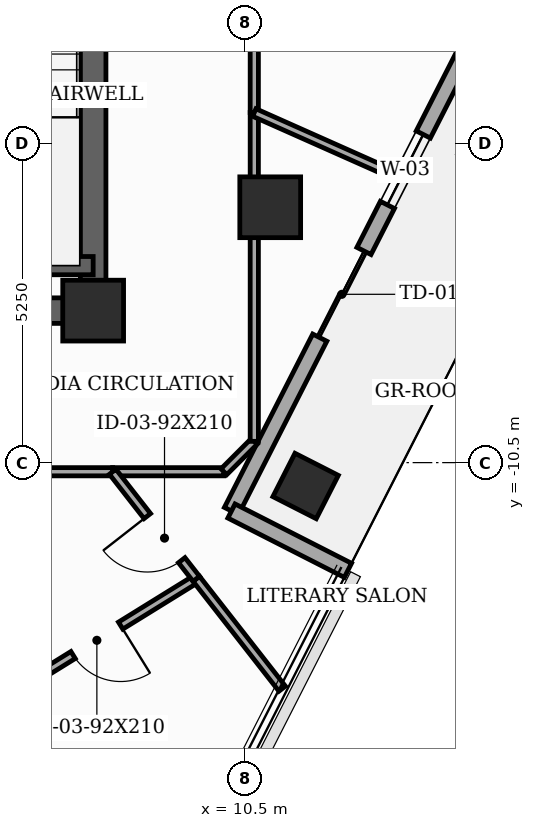
"""IFC4 building model, lengths in metres.
Left out: names, types, materials, properties, quantities, classifications, styles, units other than length and angle.
Written with IfcOpenShell. Run it as: python <this file> out.ifc"""

import sys

from ifc_helpers import new_model, si_unit, direction, frame, frame_2d, origin, origin_2d, place, context, subcontext, project, spatial, rectangle, extrude, element, fill, save


model = new_model("IFC4")
c1 = context("Model", 3, precision=1e-05, world=origin(), true_north=direction((0.0, 1.0)))
c2 = subcontext(c1, "Body", "Model", "MODEL_VIEW")
j1 = project(units=[si_unit("LENGTHUNIT", "METRE"), si_unit("PLANEANGLEUNIT", "RADIAN")], contexts=[c1])
p1 = place(None, origin())
s1 = spatial("IfcSite", under=j1, at=p1, CompositionType="ELEMENT")
p2 = place(p1, origin())
s2 = spatial("IfcBuilding", under=s1, at=p2, CompositionType="ELEMENT")
p3 = place(p2, frame((0.0, 0.0, 252.2)))
s3 = spatial("IfcBuildingStorey", under=s2, at=p3, CompositionType="ELEMENT", Elevation=252.2)
for number, where, z_axis, x_axis in (
    (1, (8.0, -8.0, 0.0), (0.0, 0.0, 1.0), (1.0, 0.0, 0.0)),
    (2, (10.912, -6.3, 0.0), (0.0, 0.0, 1.0), (1.0, 0.0, 0.0)),
):
    element("IfcColumn", number, at=place(p3, frame(where, z_axis=z_axis, x_axis=x_axis)), inside=s3, PredefinedType="COLUMN", context=c2, shape_type="SweptSolid", body=[
        extrude(rectangle(XDim=1.0, YDim=1.0, at=origin_2d()), origin(), (0.0, 0.0, 1.0), 3.7),
    ])
p4 = place(p3, frame((11.494, -10.885, 0.0), z_axis=(0.0, 0.0, 1.0), x_axis=(0.45399049974, 0.891006524188, 0.0)))
e3 = element("IfcColumn", 3, at=p4, inside=s3, PredefinedType="COLUMN", context=c2, shape_type="SweptSolid", body=[
    extrude(rectangle(XDim=0.8, YDim=0.8, at=origin_2d()), origin(), (0.0, 0.0, 1.0), 3.7),
])
p5 = place(p3, frame((10.274, -11.296, 0.0), z_axis=(0.0, 0.0, 1.0), x_axis=(0.453991476178, 0.891006026667, 0.0)))
e4 = element("IfcWall", 4, at=p5, inside=s3, PredefinedType="SOLIDWALL", context=c2, shape_type="SweptSolid", body=[
    extrude(rectangle(XDim=10.8, YDim=0.26, at=frame_2d((5.4, 0.0))), origin(), (0.0, 0.0, 1.0), 3.5),
])
p6 = place(p5, frame((3.2, 0.0, 0.0)))
e5 = element("IfcOpeningElement", 5, at=p6, cuts=e4, PredefinedType="OPENING", context=c2, shape_type="SweptSolid", body=[
    extrude(rectangle(XDim=1.6, YDim=2.08, at=frame_2d((0.8, 1.04))), frame((0.0, 0.14, 0.0), z_axis=(0.0, -1.0, 0.0), x_axis=(1.0, 0.0, 0.0)), (0.0, 0.0, 1.0), 0.28),
])
p7 = place(p5, frame((5.65, 0.0, 0.85)))
e6 = element("IfcOpeningElement", 6, at=p7, cuts=e4, PredefinedType="OPENING", context=c2, shape_type="SweptSolid", body=[
    extrude(rectangle(XDim=1.3, YDim=1.25, at=frame_2d((0.65, 0.625))), frame((0.0, 0.14, 0.0), z_axis=(0.0, -1.0, 0.0), x_axis=(1.0, 0.0, 0.0)), (0.0, 0.0, 1.0), 0.28),
])
p8 = place(p3, frame((12.19, -12.272, 0.0), z_axis=(0.0, 0.0, 1.0), x_axis=(-0.890994427822, 0.454014239413, 0.0)))
e7 = element("IfcWall", 7, at=p8, inside=s3, PredefinedType="SOLIDWALL", context=c2, shape_type="SweptSolid", body=[
    extrude(rectangle(XDim=2.15, YDim=0.26, at=frame_2d((1.075, 0.0))), origin(), (0.0, 0.0, 1.0), 3.5),
])
p9 = place(p3, frame((8.0, -8.0, 0.0), z_axis=(0.0, 0.0, 1.0), x_axis=(0.0, 1.0, 0.0)))
e8 = element("IfcWall", 8, at=p9, inside=s3, PredefinedType="SHEAR", context=c2, shape_type="SweptSolid", body=[
    extrude(rectangle(XDim=16.0, YDim=0.42, at=frame_2d((8.0, 0.0))), origin(), (0.0, 0.0, 1.0), 3.5),
])
p10 = place(p9, frame((9.6, 0.0, 0.0)))
e9 = element("IfcOpeningElement", 9, at=p10, cuts=e8, PredefinedType="OPENING", context=c2, shape_type="SweptSolid", body=[
    extrude(rectangle(XDim=1.05, YDim=2.15, at=frame_2d((0.525, 1.075))), frame((0.0, 0.22, 0.0), z_axis=(0.0, -1.0, 0.0), x_axis=(1.0, 0.0, 0.0)), (0.0, 0.0, 1.0), 0.44),
])
p11 = place(p9, frame((14.469, 0.0, 0.0)))
e10 = element("IfcOpeningElement", 10, at=p11, cuts=e8, PredefinedType="OPENING", context=c2, shape_type="SweptSolid", body=[
    extrude(rectangle(XDim=0.85, YDim=2.02, at=frame_2d((0.425, 1.01))), frame((0.0, 0.22, 0.0), z_axis=(0.0, -1.0, 0.0), x_axis=(1.0, 0.0, 0.0)), (0.0, 0.0, 1.0), 0.44),
])
p12 = place(p3, frame((-8.0, -8.0, 0.0), z_axis=(0.0, 0.0, 1.0), x_axis=(1.0, 0.0, 0.0)))
e11 = element("IfcWall", 11, at=p12, inside=s3, PredefinedType="SHEAR", context=c2, shape_type="SweptSolid", body=[
    extrude(rectangle(XDim=16.0, YDim=0.42, at=frame_2d((8.0, 0.0))), origin(), (0.0, 0.0, 1.0), 3.5),
])
p13 = place(p12, frame((7.52, 0.0, 0.0)))
e12 = element("IfcOpeningElement", 12, at=p13, cuts=e11, PredefinedType="OPENING", context=c2, shape_type="SweptSolid", body=[
    extrude(rectangle(XDim=0.95, YDim=2.1, at=frame_2d((0.475, 1.05))), frame((0.0, 0.22, 0.0), z_axis=(0.0, -1.0, 0.0), x_axis=(1.0, 0.0, 0.0)), (0.0, 0.0, 1.0), 0.44),
])
p14 = place(p3, frame((4.45, -7.26, 0.0), z_axis=(0.0, 0.0, 1.0), x_axis=(1.0, 0.0, 0.0)))
e13 = element("IfcWall", 13, at=p14, inside=s3, PredefinedType="SHEAR", context=c2, shape_type="SweptSolid", body=[
    extrude(rectangle(XDim=3.55, YDim=0.3, at=frame_2d((1.775, 0.0))), origin(), (0.0, 0.0, 1.0), 3.5),
])
p15 = place(p3, frame((10.65, -4.742, 0.0), z_axis=(0.0, 0.0, 1.0), x_axis=(0.0, 1.0, 0.0)))
e14 = element("IfcWall", 14, at=p15, inside=s3, PredefinedType="PARTITIONING", context=c2, shape_type="SweptSolid", body=[
    extrude(rectangle(XDim=6.224, YDim=0.135, at=frame_2d((3.112, 0.0))), origin(), (0.0, 0.0, 1.0), 2.885),
])
p16 = place(p15, frame((2.637, 0.0, 0.0)))
e15 = element("IfcOpeningElement", 15, at=p16, cuts=e14, PredefinedType="OPENING", context=c2, shape_type="SweptSolid", body=[
    extrude(rectangle(XDim=0.95, YDim=2.1, at=frame_2d((0.475, 1.05))), frame((0.0, 0.077, 0.0), z_axis=(0.0, -1.0, 0.0), x_axis=(1.0, 0.0, 0.0)), (0.0, 0.0, 1.0), 0.155),
])
p17 = place(p3, frame((2.45, -10.65, 0.0), z_axis=(0.0, 0.0, 1.0), x_axis=(1.0, 0.0, 0.0)))
e16 = element("IfcWall", 16, at=p17, inside=s3, PredefinedType="PARTITIONING", context=c2, shape_type="SweptSolid", body=[
    extrude(rectangle(XDim=5.871, YDim=0.135, at=frame_2d((2.936, 0.0))), origin(), (0.0, 0.0, 1.0), 2.885),
])
p18 = place(p17, frame((0.699, 0.0, 0.0)))
e17 = element("IfcOpeningElement", 17, at=p18, cuts=e16, PredefinedType="OPENING", context=c2, shape_type="SweptSolid", body=[
    extrude(rectangle(XDim=0.95, YDim=2.1, at=frame_2d((0.475, 1.05))), frame((0.0, 0.077, 0.0), z_axis=(0.0, -1.0, 0.0), x_axis=(1.0, 0.0, 0.0)), (0.0, 0.0, 1.0), 0.155),
])
p19 = place(p3, frame((8.321, -10.65, 0.0), z_axis=(0.0, 0.0, 1.0), x_axis=(1.0, 0.0, 0.0)))
e18 = element("IfcWall", 18, at=p19, inside=s3, PredefinedType="PARTITIONING", context=c2, shape_type="SweptSolid", body=[
    extrude(rectangle(XDim=1.829, YDim=0.135, at=frame_2d((0.915, 0.0))), origin(), (0.0, 0.0, 1.0), 3.5),
])
p20 = place(p3, frame((10.15, -10.65, 0.0), z_axis=(0.0, 0.0, 1.0), x_axis=(0.707106781187, 0.707106781187, 0.0)))
e19 = element("IfcWall", 19, at=p20, inside=s3, PredefinedType="PARTITIONING", context=c2, shape_type="SweptSolid", body=[
    extrude(rectangle(XDim=0.707, YDim=0.135, at=frame_2d((0.354, 0.0))), origin(), (0.0, 0.0, 1.0), 3.5),
])
p21 = place(p3, frame((10.65, -10.15, 0.0), z_axis=(0.0, 0.0, 1.0), x_axis=(0.0, 1.0, 0.0)))
e20 = element("IfcWall", 20, at=p21, inside=s3, PredefinedType="PARTITIONING", context=c2, shape_type="SweptSolid", body=[
    extrude(rectangle(XDim=5.408, YDim=0.135, at=frame_2d((2.704, 0.0))), origin(), (0.0, 0.0, 1.0), 2.885),
])
p22 = place(p3, frame((10.65, -4.742, 0.0), z_axis=(0.0, 0.0, 1.0), x_axis=(0.913666216357, -0.406465306131, 0.0)))
e21 = element("IfcWall", 21, at=p22, inside=s3, PredefinedType="PARTITIONING", context=c2, shape_type="SweptSolid", body=[
    extrude(rectangle(XDim=2.564, YDim=0.135, at=frame_2d((1.282, 0.0))), origin(), (0.0, 0.0, 1.0), 2.885),
])
p23 = place(p3, frame((9.696, -12.411, 0.0), z_axis=(0.0, 0.0, 1.0), x_axis=(-0.850393663863, -0.526146953295, 0.0)))
e22 = element("IfcWall", 22, at=p23, inside=s3, PredefinedType="PARTITIONING", context=c2, shape_type="SweptSolid", body=[
    extrude(rectangle(XDim=3.845, YDim=0.135, at=frame_2d((1.923, 0.0))), origin(), (0.0, 0.0, 1.0), 3.035),
])
p24 = place(p23, frame((1.463, 0.0, 0.0)))
e23 = element("IfcOpeningElement", 23, at=p24, cuts=e22, PredefinedType="OPENING", context=c2, shape_type="SweptSolid", body=[
    extrude(rectangle(XDim=0.92, YDim=2.1, at=frame_2d((0.46, 1.05))), frame((0.0, 0.077, 0.0), z_axis=(0.0, -1.0, 0.0), x_axis=(1.0, 0.0, 0.0)), (0.0, 0.0, 1.0), 0.155),
])
p25 = place(p3, frame((11.108, -14.218, 0.0), z_axis=(0.0, 0.0, 1.0), x_axis=(-0.615736984334, 0.787951753677, 0.0)))
e24 = element("IfcWall", 24, at=p25, inside=s3, PredefinedType="PARTITIONING", context=c2, shape_type="SweptSolid", body=[
    extrude(rectangle(XDim=2.294, YDim=0.135, at=frame_2d((1.147, 0.0))), origin(), (0.0, 0.0, 1.0), 3.035),
])
p26 = place(p3, frame((9.696, -12.411, 0.0), z_axis=(0.0, 0.0, 1.0), x_axis=(-0.615429845305, 0.788191668002, 0.0)))
e25 = element("IfcWall", 25, at=p26, inside=s3, PredefinedType="PARTITIONING", context=c2, shape_type="SweptSolid", body=[
    extrude(rectangle(XDim=2.234, YDim=0.135, at=frame_2d((1.117, 0.0))), origin(), (0.0, 0.0, 1.0), 3.5),
])
p27 = place(p26, frame((0.389, 0.0, 0.0)))
e26 = element("IfcOpeningElement", 26, at=p27, cuts=e25, PredefinedType="OPENING", context=c2, shape_type="SweptSolid", body=[
    extrude(rectangle(XDim=0.92, YDim=2.1, at=frame_2d((0.46, 1.05))), frame((0.0, 0.077, 0.0), z_axis=(0.0, -1.0, 0.0), x_axis=(1.0, 0.0, 0.0)), (0.0, 0.0, 1.0), 0.155),
])
p28 = place(p6, frame((1.6, 0.0, 0.0), z_axis=(0.0, 0.0, 1.0), x_axis=(-1.0, 0.0, 0.0)))
e27 = element("IfcDoor", 27, at=p28, inside=s3, OperationType="DOUBLE_DOOR_SLIDING", PredefinedType="DOOR", context=c2, shape_type="SweptSolid", body=[
    extrude(rectangle(XDim=1.6, YDim=2.08, at=frame_2d((0.8, 1.04))), frame((0.0, 0.025, 0.0), z_axis=(0.0, -1.0, 0.0), x_axis=(1.0, 0.0, 0.0)), (0.0, 0.0, 1.0), 0.05),
])
fill(e5, e27)
p29 = place(p7, origin())
e28 = element("IfcWindow", 28, at=p29, inside=s3, PartitioningType="SINGLE_PANEL", PredefinedType="WINDOW", context=c2, shape_type="SweptSolid", body=[
    extrude(rectangle(XDim=1.3, YDim=1.25, at=frame_2d((0.65, 0.625))), frame((0.0, 0.03, 0.0), z_axis=(0.0, -1.0, 0.0), x_axis=(1.0, 0.0, 0.0)), (0.0, 0.0, 1.0), 0.06),
])
fill(e6, e28)
p30 = place(p24, origin())
e29 = element("IfcDoor", 29, at=p30, inside=s3, OperationType="SINGLE_SWING_LEFT", PredefinedType="DOOR", context=c2, shape_type="SweptSolid", body=[
    extrude(rectangle(XDim=0.92, YDim=2.1, at=frame_2d((0.46, 1.05))), frame((0.0, 0.025, 0.0), z_axis=(0.0, -1.0, 0.0), x_axis=(1.0, 0.0, 0.0)), (0.0, 0.0, 1.0), 0.05),
])
fill(e23, e29)
p31 = place(p27, origin())
e30 = element("IfcDoor", 30, at=p31, inside=s3, OperationType="SINGLE_SWING_RIGHT", PredefinedType="DOOR", context=c2, shape_type="SweptSolid", body=[
    extrude(rectangle(XDim=0.92, YDim=2.1, at=frame_2d((0.46, 1.05))), frame((0.0, 0.025, 0.0), z_axis=(0.0, -1.0, 0.0), x_axis=(1.0, 0.0, 0.0)), (0.0, 0.0, 1.0), 0.05),
])
fill(e26, e30)
save(model, sys.argv[1])
